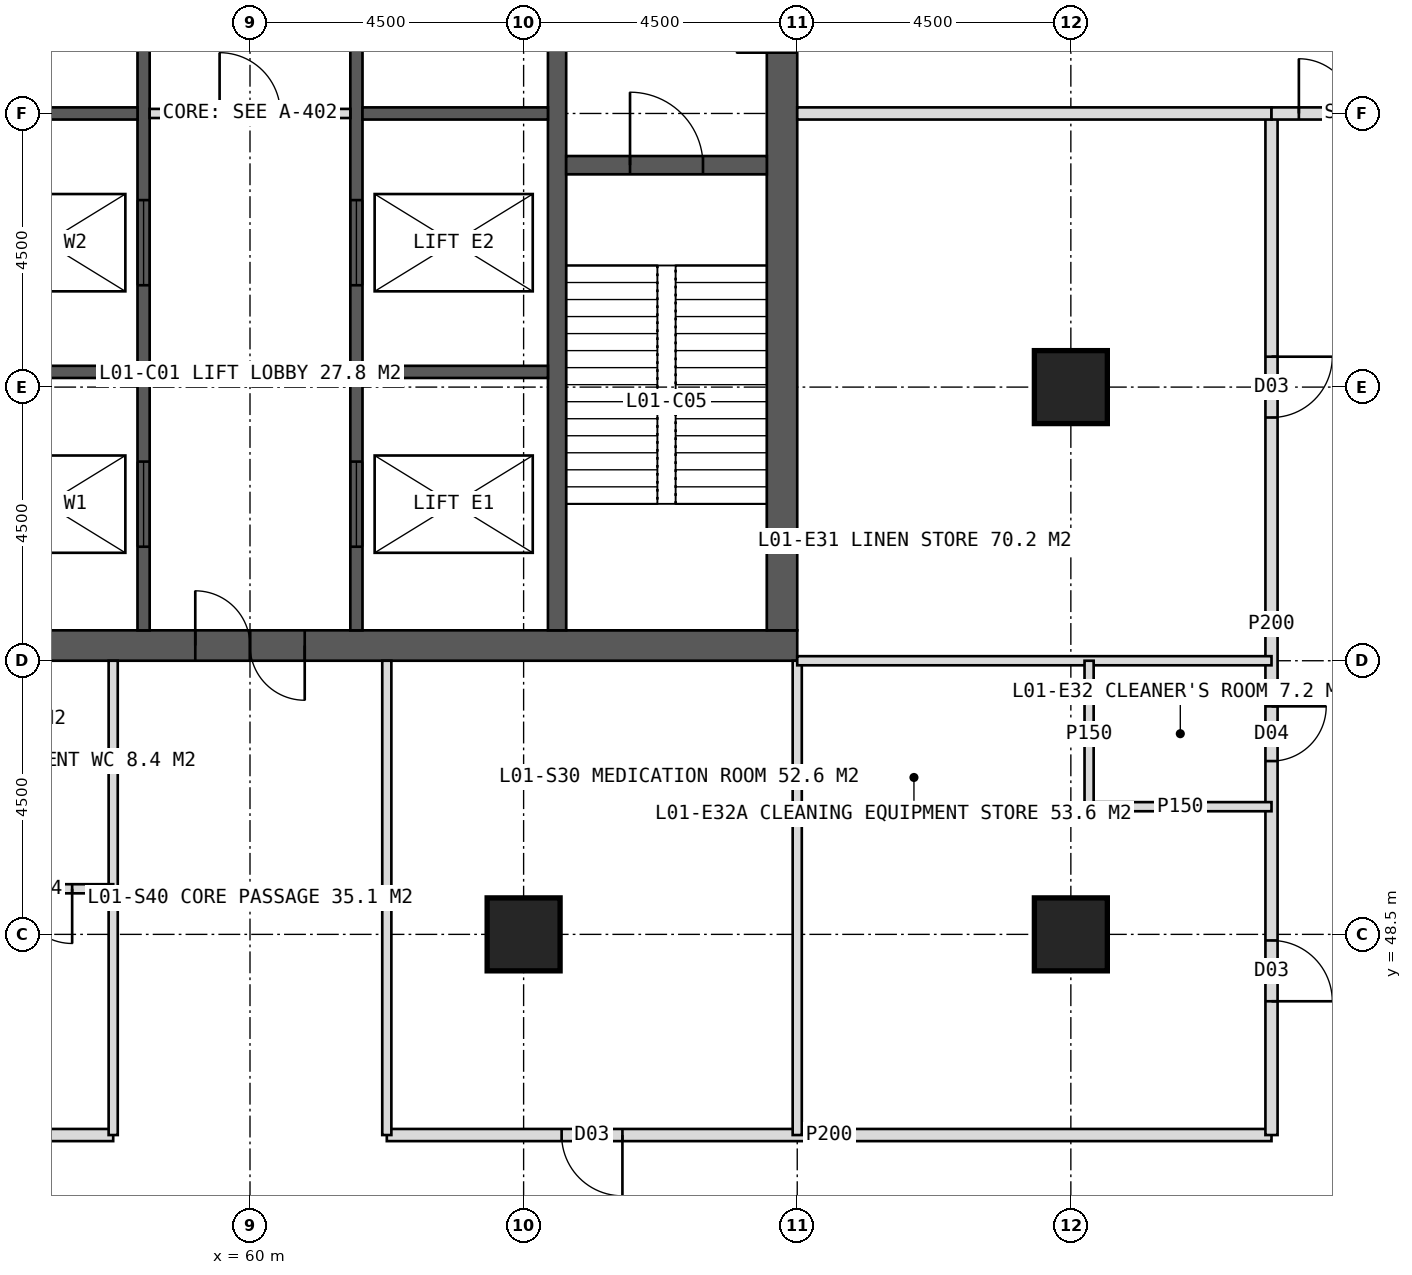
"""IFC4 building model, lengths in metres.
Left out: names, types, materials, properties, quantities, classifications, styles, units other than length and angle.
Written with IfcOpenShell. Run it as: python <this file> out.ifc"""

import sys

from ifc_helpers import new_model, si_unit, direction, frame, frame_2d, origin, origin_2d, place, context, subcontext, project, spatial, rectangle, hollow_rectangle, extrude, element, fill, save


model = new_model("IFC4")
c1 = context("Model", 3, precision=1e-05, world=origin(), true_north=direction((0.0, 1.0)))
c2 = subcontext(c1, "Body", "Model", "MODEL_VIEW")
j1 = project(units=[si_unit("LENGTHUNIT", "METRE"), si_unit("PLANEANGLEUNIT", "RADIAN")], contexts=[c1])
p1 = place(None, origin())
s1 = spatial("IfcSite", under=j1, at=p1, CompositionType="ELEMENT")
p2 = place(p1, origin())
s2 = spatial("IfcBuilding", under=s1, at=p2, CompositionType="ELEMENT")
p3 = place(p2, frame((0.0, 0.0, 6.0)))
s3 = spatial("IfcBuildingStorey", under=s2, at=p3, CompositionType="ELEMENT", Elevation=6.0)
p4 = place(p3, frame((51.0, 53.25, 0.0), z_axis=(0.0, 0.0, 1.0), x_axis=(1.0, 0.0, 0.0)))
e1 = element("IfcWall", 1, at=p4, inside=s3, PredefinedType="SHEAR", context=c2, shape_type="SweptSolid", body=[
    extrude(rectangle(XDim=18.0, YDim=0.5, at=frame_2d((9.0, 0.0))), origin(), (0.0, 0.0, 1.0), 5.0),
])
p5 = place(p4, frame((8.1, 0.0, 0.0)))
e2 = element("IfcOpeningElement", 2, at=p5, cuts=e1, PredefinedType="OPENING", context=c2, shape_type="SweptSolid", body=[
    extrude(rectangle(XDim=1.8, YDim=2.2, at=frame_2d((0.9, 1.1))), frame((0.0, 0.26, 0.0), z_axis=(0.0, -1.0, 0.0), x_axis=(1.0, 0.0, 0.0)), (0.0, 0.0, 1.0), 0.52),
])
p6 = place(p3, frame((68.75, 53.5, 0.0), z_axis=(0.0, 0.0, 1.0), x_axis=(0.0, 1.0, 0.0)))
e3 = element("IfcWall", 3, at=p6, inside=s3, PredefinedType="SHEAR", context=c2, shape_type="SweptSolid", body=[
    extrude(rectangle(XDim=17.0, YDim=0.5, at=frame_2d((8.5, 0.0))), origin(), (0.0, 0.0, 1.0), 5.0),
])
p7 = place(p6, frame((9.5, 0.0, 0.0)))
e4 = element("IfcOpeningElement", 4, at=p7, cuts=e3, PredefinedType="OPENING", context=c2, shape_type="SweptSolid", body=[
    extrude(rectangle(XDim=1.5, YDim=2.2, at=frame_2d((0.75, 1.1))), frame((0.0, 0.26, 0.0), z_axis=(0.0, -1.0, 0.0), x_axis=(1.0, 0.0, 0.0)), (0.0, 0.0, 1.0), 0.52),
])
p8 = place(p3, frame((65.05, 53.5, 0.0), z_axis=(0.0, 0.0, 1.0), x_axis=(0.0, 1.0, 0.0)))
e5 = element("IfcWall", 5, at=p8, inside=s3, PredefinedType="SHEAR", context=c2, shape_type="SweptSolid", body=[
    extrude(rectangle(XDim=17.0, YDim=0.3, at=frame_2d((8.5, 0.0))), origin(), (0.0, 0.0, 1.0), 5.0),
])
p9 = place(p3, frame((58.25, 53.5, 0.0), z_axis=(0.0, 0.0, 1.0), x_axis=(0.0, 1.0, 0.0)))
e6 = element("IfcWall", 6, at=p9, inside=s3, PredefinedType="SHEAR", context=c2, shape_type="SweptSolid", body=[
    extrude(rectangle(XDim=17.0, YDim=0.2, at=frame_2d((8.5, 0.0))), origin(), (0.0, 0.0, 1.0), 5.0),
])
p10 = place(p9, frame((1.375, 0.0, 0.0)))
e7 = element("IfcOpeningElement", 7, at=p10, cuts=e6, PredefinedType="OPENING", context=c2, shape_type="SweptSolid", body=[
    extrude(rectangle(XDim=1.4, YDim=2.2, at=frame_2d((0.7, 1.1))), frame((0.0, 0.11, 0.0), z_axis=(0.0, -1.0, 0.0), x_axis=(1.0, 0.0, 0.0)), (0.0, 0.0, 1.0), 0.22),
])
p11 = place(p9, frame((5.675, 0.0, 0.0)))
e8 = element("IfcOpeningElement", 8, at=p11, cuts=e6, PredefinedType="OPENING", context=c2, shape_type="SweptSolid", body=[
    extrude(rectangle(XDim=1.4, YDim=2.2, at=frame_2d((0.7, 1.1))), frame((0.0, 0.11, 0.0), z_axis=(0.0, -1.0, 0.0), x_axis=(1.0, 0.0, 0.0)), (0.0, 0.0, 1.0), 0.22),
])
p12 = place(p3, frame((61.75, 53.5, 0.0), z_axis=(0.0, 0.0, 1.0), x_axis=(0.0, 1.0, 0.0)))
e9 = element("IfcWall", 9, at=p12, inside=s3, PredefinedType="SHEAR", context=c2, shape_type="SweptSolid", body=[
    extrude(rectangle(XDim=17.0, YDim=0.2, at=frame_2d((8.5, 0.0))), origin(), (0.0, 0.0, 1.0), 5.0),
])
p13 = place(p12, frame((1.375, 0.0, 0.0)))
e10 = element("IfcOpeningElement", 10, at=p13, cuts=e9, PredefinedType="OPENING", context=c2, shape_type="SweptSolid", body=[
    extrude(rectangle(XDim=1.4, YDim=2.2, at=frame_2d((0.7, 1.1))), frame((0.0, 0.11, 0.0), z_axis=(0.0, -1.0, 0.0), x_axis=(1.0, 0.0, 0.0)), (0.0, 0.0, 1.0), 0.22),
])
p14 = place(p12, frame((5.675, 0.0, 0.0)))
e11 = element("IfcOpeningElement", 11, at=p14, cuts=e9, PredefinedType="OPENING", context=c2, shape_type="SweptSolid", body=[
    extrude(rectangle(XDim=1.4, YDim=2.2, at=frame_2d((0.7, 1.1))), frame((0.0, 0.11, 0.0), z_axis=(0.0, -1.0, 0.0), x_axis=(1.0, 0.0, 0.0)), (0.0, 0.0, 1.0), 0.22),
])
for number, where, z_axis, x_axis in (
    (12, (55.1, 57.75, 0.0), (0.0, 0.0, 1.0), (1.0, 0.0, 0.0)),
    (13, (61.85, 57.75, 0.0), (0.0, 0.0, 1.0), (1.0, 0.0, 0.0)),
    (14, (55.1, 62.0, 0.0), (0.0, 0.0, 1.0), (1.0, 0.0, 0.0)),
    (15, (61.85, 62.0, 0.0), (0.0, 0.0, 1.0), (1.0, 0.0, 0.0)),
):
    element("IfcWall", number, at=place(p3, frame(where, z_axis=z_axis, x_axis=x_axis)), inside=s3, PredefinedType="SHEAR", context=c2, shape_type="SweptSolid", body=[
        extrude(rectangle(XDim=3.05, YDim=0.2, at=frame_2d((1.525, 0.0))), origin(), (0.0, 0.0, 1.0), 5.0),
    ])
p15 = place(p3, frame((65.2, 61.15, 0.0), z_axis=(0.0, 0.0, 1.0), x_axis=(1.0, 0.0, 0.0)))
e16 = element("IfcWall", 16, at=p15, inside=s3, PredefinedType="SHEAR", context=c2, shape_type="SweptSolid", body=[
    extrude(rectangle(XDim=3.3, YDim=0.3, at=frame_2d((1.65, 0.0))), origin(), (0.0, 0.0, 1.0), 5.0),
])
p16 = place(p15, frame((1.05, 0.0, 0.0)))
e17 = element("IfcOpeningElement", 17, at=p16, cuts=e16, PredefinedType="OPENING", context=c2, shape_type="SweptSolid", body=[
    extrude(rectangle(XDim=1.2, YDim=2.1, at=frame_2d((0.6, 1.05))), frame((0.0, 0.16, 0.0), z_axis=(0.0, -1.0, 0.0), x_axis=(1.0, 0.0, 0.0)), (0.0, 0.0, 1.0), 0.32),
])
for number, where, z_axis, x_axis in (
    (18, (73.5, 48.5, 0.0), (0.0, 0.0, 1.0), (1.0, 0.0, 0.0)),
    (19, (64.5, 48.5, 0.0), (0.0, 0.0, 1.0), (1.0, 0.0, 0.0)),
    (20, (73.5, 57.5, 0.0), (0.0, 0.0, 1.0), (1.0, 0.0, 0.0)),
):
    element("IfcColumn", number, at=place(p3, frame(where, z_axis=z_axis, x_axis=x_axis)), inside=s3, PredefinedType="COLUMN", context=c2, shape_type="SweptSolid", body=[
        extrude(hollow_rectangle(XDim=1.2, YDim=1.2, WallThickness=0.1, at=origin_2d()), origin(), (0.0, 0.0, 1.0), 5.0),
    ])
p17 = place(p3, frame((76.8, 45.2, 0.0), z_axis=(0.0, 0.0, 1.0), x_axis=(-1.0, 0.0, 0.0)))
e21 = element("IfcWall", 21, at=p17, inside=s3, PredefinedType="PARTITIONING", context=c2, shape_type="SweptSolid", body=[
    extrude(rectangle(XDim=14.55, YDim=0.2, at=frame_2d((7.275, 0.0))), origin(), (0.0, 0.0, 1.0), 4.7),
])
p18 = place(p17, frame((10.675, 0.0, 0.0)))
e22 = element("IfcOpeningElement", 22, at=p18, cuts=e21, PredefinedType="OPENING", context=c2, shape_type="SweptSolid", body=[
    extrude(rectangle(XDim=1.0, YDim=2.1, at=frame_2d((0.5, 1.05))), frame((0.0, 0.11, 0.0), z_axis=(0.0, -1.0, 0.0), x_axis=(1.0, 0.0, 0.0)), (0.0, 0.0, 1.0), 0.22),
])
p19 = place(p3, frame((57.75, 45.2, 0.0), z_axis=(0.0, 0.0, 1.0), x_axis=(-1.0, 0.0, 0.0)))
e23 = element("IfcWall", 23, at=p19, inside=s3, PredefinedType="PARTITIONING", context=c2, shape_type="SweptSolid", body=[
    extrude(rectangle(XDim=14.55, YDim=0.2, at=frame_2d((7.275, 0.0))), origin(), (0.0, 0.0, 1.0), 4.7),
])
p20 = place(p19, frame((2.875, 0.0, 0.0)))
e24 = element("IfcOpeningElement", 24, at=p20, cuts=e23, PredefinedType="OPENING", context=c2, shape_type="SweptSolid", body=[
    extrude(rectangle(XDim=1.0, YDim=2.1, at=frame_2d((0.5, 1.05))), frame((0.0, 0.11, 0.0), z_axis=(0.0, -1.0, 0.0), x_axis=(1.0, 0.0, 0.0)), (0.0, 0.0, 1.0), 0.22),
])
p21 = place(p19, frame((10.15, 0.0, 0.0)))
e25 = element("IfcOpeningElement", 25, at=p21, cuts=e23, PredefinedType="OPENING", context=c2, shape_type="SweptSolid", body=[
    extrude(rectangle(XDim=1.0, YDim=2.1, at=frame_2d((0.5, 1.05))), frame((0.0, 0.11, 0.0), z_axis=(0.0, -1.0, 0.0), x_axis=(1.0, 0.0, 0.0)), (0.0, 0.0, 1.0), 0.22),
])
for number, where, z_axis, x_axis in (
    (26, (69.0, 53.0, 0.0), (0.0, 0.0, 1.0), (0.0, -1.0, 0.0)),
    (27, (62.25, 53.0, 0.0), (0.0, 0.0, 1.0), (0.0, -1.0, 0.0)),
    (28, (57.75, 53.0, 0.0), (0.0, 0.0, 1.0), (0.0, -1.0, 0.0)),
):
    element("IfcWall", number, at=place(p3, frame(where, z_axis=z_axis, x_axis=x_axis)), inside=s3, PredefinedType="PARTITIONING", context=c2, shape_type="SweptSolid", body=[
        extrude(rectangle(XDim=7.8, YDim=0.15, at=frame_2d((3.9, 0.0))), origin(), (0.0, 0.0, 1.0), 4.7),
    ])
p22 = place(p3, frame((57.75, 49.25, 0.0), z_axis=(0.0, 0.0, 1.0), x_axis=(-1.0, 0.0, 0.0)))
e29 = element("IfcWall", 29, at=p22, inside=s3, PredefinedType="PARTITIONING", context=c2, shape_type="SweptSolid", body=[
    extrude(rectangle(XDim=6.75, YDim=0.15, at=frame_2d((3.375, 0.0))), origin(), (0.0, 0.0, 1.0), 4.7),
])
p23 = place(p22, frame((0.675, 0.0, 0.0)))
e30 = element("IfcOpeningElement", 30, at=p23, cuts=e29, PredefinedType="OPENING", context=c2, shape_type="SweptSolid", body=[
    extrude(rectangle(XDim=0.9, YDim=2.1, at=frame_2d((0.45, 1.05))), frame((0.0, 0.085, 0.0), z_axis=(0.0, -1.0, 0.0), x_axis=(1.0, 0.0, 0.0)), (0.0, 0.0, 1.0), 0.17),
])
p24 = place(p22, frame((3.05, 0.0, 0.0)))
e31 = element("IfcOpeningElement", 31, at=p24, cuts=e29, PredefinedType="OPENING", context=c2, shape_type="SweptSolid", body=[
    extrude(rectangle(XDim=1.0, YDim=2.1, at=frame_2d((0.5, 1.05))), frame((0.0, 0.085, 0.0), z_axis=(0.0, -1.0, 0.0), x_axis=(1.0, 0.0, 0.0)), (0.0, 0.0, 1.0), 0.17),
])
p25 = place(p22, frame((5.35, 0.0, 0.0)))
e32 = element("IfcOpeningElement", 32, at=p25, cuts=e29, PredefinedType="OPENING", context=c2, shape_type="SweptSolid", body=[
    extrude(rectangle(XDim=0.9, YDim=2.1, at=frame_2d((0.45, 1.05))), frame((0.0, 0.085, 0.0), z_axis=(0.0, -1.0, 0.0), x_axis=(1.0, 0.0, 0.0)), (0.0, 0.0, 1.0), 0.17),
])
p26 = place(p3, frame((76.8, 62.0, 0.0), z_axis=(0.0, 0.0, 1.0), x_axis=(0.0, -1.0, 0.0)))
e33 = element("IfcWall", 33, at=p26, inside=s3, PredefinedType="PARTITIONING", context=c2, shape_type="SweptSolid", body=[
    extrude(rectangle(XDim=16.8, YDim=0.2, at=frame_2d((8.4, 0.0))), origin(), (0.0, 0.0, 1.0), 4.7),
])
p27 = place(p26, frame((4.0, 0.0, 0.0)))
e34 = element("IfcOpeningElement", 34, at=p27, cuts=e33, PredefinedType="OPENING", context=c2, shape_type="SweptSolid", body=[
    extrude(rectangle(XDim=1.0, YDim=2.1, at=frame_2d((0.5, 1.05))), frame((0.0, 0.11, 0.0), z_axis=(0.0, -1.0, 0.0), x_axis=(1.0, 0.0, 0.0)), (0.0, 0.0, 1.0), 0.22),
])
p28 = place(p26, frame((9.75, 0.0, 0.0)))
e35 = element("IfcOpeningElement", 35, at=p28, cuts=e33, PredefinedType="OPENING", context=c2, shape_type="SweptSolid", body=[
    extrude(rectangle(XDim=0.9, YDim=2.1, at=frame_2d((0.45, 1.05))), frame((0.0, 0.11, 0.0), z_axis=(0.0, -1.0, 0.0), x_axis=(1.0, 0.0, 0.0)), (0.0, 0.0, 1.0), 0.22),
])
p29 = place(p26, frame((13.6, 0.0, 0.0)))
e36 = element("IfcOpeningElement", 36, at=p29, cuts=e33, PredefinedType="OPENING", context=c2, shape_type="SweptSolid", body=[
    extrude(rectangle(XDim=1.0, YDim=2.1, at=frame_2d((0.5, 1.05))), frame((0.0, 0.11, 0.0), z_axis=(0.0, -1.0, 0.0), x_axis=(1.0, 0.0, 0.0)), (0.0, 0.0, 1.0), 0.22),
])
p30 = place(p3, frame((69.0, 62.0, 0.0), z_axis=(0.0, 0.0, 1.0), x_axis=(1.0, 0.0, 0.0)))
e37 = element("IfcWall", 37, at=p30, inside=s3, PredefinedType="SOLIDWALL", context=c2, shape_type="SweptSolid", body=[
    extrude(rectangle(XDim=7.8, YDim=0.2, at=frame_2d((3.9, 0.0))), origin(), (0.0, 0.0, 1.0), 3.9),
])
p31 = place(p3, frame((69.0, 53.0, 0.0), z_axis=(0.0, 0.0, 1.0), x_axis=(1.0, 0.0, 0.0)))
e38 = element("IfcWall", 38, at=p31, inside=s3, PredefinedType="PARTITIONING", context=c2, shape_type="SweptSolid", body=[
    extrude(rectangle(XDim=7.8, YDim=0.15, at=frame_2d((3.9, 0.0))), origin(), (0.0, 0.0, 1.0), 4.7),
])
p32 = place(p3, frame((73.8, 50.6, 0.0), z_axis=(0.0, 0.0, 1.0), x_axis=(1.0, 0.0, 0.0)))
e39 = element("IfcWall", 39, at=p32, inside=s3, PredefinedType="PARTITIONING", context=c2, shape_type="SweptSolid", body=[
    extrude(rectangle(XDim=3.0, YDim=0.15, at=frame_2d((1.5, 0.0))), origin(), (0.0, 0.0, 1.0), 4.7),
])
p33 = place(p3, frame((73.8, 53.0, 0.0), z_axis=(0.0, 0.0, 1.0), x_axis=(0.0, -1.0, 0.0)))
e40 = element("IfcWall", 40, at=p33, inside=s3, PredefinedType="PARTITIONING", context=c2, shape_type="SweptSolid", body=[
    extrude(rectangle(XDim=2.4, YDim=0.15, at=frame_2d((1.2, 0.0))), origin(), (0.0, 0.0, 1.0), 4.7),
])
p34 = place(p3, frame((76.8, 62.0, 0.0), z_axis=(0.0, 0.0, 1.0), x_axis=(1.0, 0.0, 0.0)))
e41 = element("IfcWall", 41, at=p34, inside=s3, PredefinedType="SOLIDWALL", context=c2, shape_type="SweptSolid", body=[
    extrude(rectangle(XDim=2.7, YDim=0.2, at=frame_2d((1.35, 0.0))), origin(), (0.0, 0.0, 1.0), 3.9),
])
p35 = place(p34, frame((0.45, 0.0, 0.0)))
e42 = element("IfcOpeningElement", 42, at=p35, cuts=e41, PredefinedType="OPENING", context=c2, shape_type="SweptSolid", body=[
    extrude(rectangle(XDim=1.8, YDim=2.2, at=frame_2d((0.9, 1.1))), frame((0.0, 0.11, 0.0), z_axis=(0.0, -1.0, 0.0), x_axis=(1.0, 0.0, 0.0)), (0.0, 0.0, 1.0), 0.22),
])
p36 = place(p3, frame((58.35, 62.0, 0.0), z_axis=(0.0, 0.0, 1.0), x_axis=(1.0, 0.0, 0.0)))
e43 = element("IfcWall", 43, at=p36, inside=s3, PredefinedType="PARTITIONING", context=c2, shape_type="SweptSolid", body=[
    extrude(rectangle(XDim=3.3, YDim=0.15, at=frame_2d((1.65, 0.0))), origin(), (0.0, 0.0, 1.0), 4.7),
])
p37 = place(p36, frame((1.15, 0.0, 0.0)))
e44 = element("IfcOpeningElement", 44, at=p37, cuts=e43, PredefinedType="OPENING", context=c2, shape_type="SweptSolid", body=[
    extrude(rectangle(XDim=1.0, YDim=2.1, at=frame_2d((0.5, 1.05))), frame((0.0, 0.085, 0.0), z_axis=(0.0, -1.0, 0.0), x_axis=(1.0, 0.0, 0.0)), (0.0, 0.0, 1.0), 0.17),
])
p38 = place(p18, origin())
e45 = element("IfcDoor", 45, at=p38, inside=s3, OperationType="SINGLE_SWING_LEFT", PredefinedType="DOOR", context=c2, shape_type="SweptSolid", body=[
    extrude(rectangle(XDim=1.0, YDim=2.1, at=frame_2d((0.5, 1.05))), frame((0.0, 0.025, 0.0), z_axis=(0.0, -1.0, 0.0), x_axis=(1.0, 0.0, 0.0)), (0.0, 0.0, 1.0), 0.05),
])
fill(e22, e45)
p39 = place(p27, origin())
e46 = element("IfcDoor", 46, at=p39, inside=s3, OperationType="SINGLE_SWING_LEFT", PredefinedType="DOOR", context=c2, shape_type="SweptSolid", body=[
    extrude(rectangle(XDim=1.0, YDim=2.1, at=frame_2d((0.5, 1.05))), frame((0.0, 0.025, 0.0), z_axis=(0.0, -1.0, 0.0), x_axis=(1.0, 0.0, 0.0)), (0.0, 0.0, 1.0), 0.05),
])
fill(e34, e46)
p40 = place(p35, origin())
e47 = element("IfcDoor", 47, at=p40, inside=s3, OperationType="DOUBLE_DOOR_DOUBLE_SWING", PredefinedType="DOOR", context=c2, shape_type="SweptSolid", body=[
    extrude(rectangle(XDim=1.8, YDim=2.2, at=frame_2d((0.9, 1.1))), frame((0.0, 0.025, 0.0), z_axis=(0.0, -1.0, 0.0), x_axis=(1.0, 0.0, 0.0)), (0.0, 0.0, 1.0), 0.05),
])
fill(e42, e47)
p41 = place(p5, origin())
e48 = element("IfcDoor", 48, at=p41, inside=s3, OperationType="DOUBLE_DOOR_SINGLE_SWING", PredefinedType="DOOR", context=c2, shape_type="SweptSolid", body=[
    extrude(rectangle(XDim=1.8, YDim=2.2, at=frame_2d((0.9, 1.1))), frame((0.0, 0.025, 0.0), z_axis=(0.0, -1.0, 0.0), x_axis=(1.0, 0.0, 0.0)), (0.0, 0.0, 1.0), 0.05),
])
fill(e2, e48)
p42 = place(p16, origin())
e49 = element("IfcDoor", 49, at=p42, inside=s3, OperationType="SINGLE_SWING_LEFT", PredefinedType="DOOR", context=c2, shape_type="SweptSolid", body=[
    extrude(rectangle(XDim=1.2, YDim=2.1, at=frame_2d((0.6, 1.05))), frame((0.0, 0.025, 0.0), z_axis=(0.0, -1.0, 0.0), x_axis=(1.0, 0.0, 0.0)), (0.0, 0.0, 1.0), 0.05),
])
fill(e17, e49)
p43 = place(p10, origin())
e50 = element("IfcDoor", 50, at=p43, inside=s3, OperationType="SLIDING_TO_LEFT", PredefinedType="DOOR", context=c2, shape_type="SweptSolid", body=[
    extrude(rectangle(XDim=1.4, YDim=2.2, at=frame_2d((0.7, 1.1))), frame((0.0, 0.025, 0.0), z_axis=(0.0, -1.0, 0.0), x_axis=(1.0, 0.0, 0.0)), (0.0, 0.0, 1.0), 0.05),
])
fill(e7, e50)
p44 = place(p13, origin())
e51 = element("IfcDoor", 51, at=p44, inside=s3, OperationType="SLIDING_TO_LEFT", PredefinedType="DOOR", context=c2, shape_type="SweptSolid", body=[
    extrude(rectangle(XDim=1.4, YDim=2.2, at=frame_2d((0.7, 1.1))), frame((0.0, 0.025, 0.0), z_axis=(0.0, -1.0, 0.0), x_axis=(1.0, 0.0, 0.0)), (0.0, 0.0, 1.0), 0.05),
])
fill(e10, e51)
p45 = place(p11, origin())
e52 = element("IfcDoor", 52, at=p45, inside=s3, OperationType="SLIDING_TO_LEFT", PredefinedType="DOOR", context=c2, shape_type="SweptSolid", body=[
    extrude(rectangle(XDim=1.4, YDim=2.2, at=frame_2d((0.7, 1.1))), frame((0.0, 0.025, 0.0), z_axis=(0.0, -1.0, 0.0), x_axis=(1.0, 0.0, 0.0)), (0.0, 0.0, 1.0), 0.05),
])
fill(e8, e52)
p46 = place(p14, origin())
e53 = element("IfcDoor", 53, at=p46, inside=s3, OperationType="SLIDING_TO_LEFT", PredefinedType="DOOR", context=c2, shape_type="SweptSolid", body=[
    extrude(rectangle(XDim=1.4, YDim=2.2, at=frame_2d((0.7, 1.1))), frame((0.0, 0.025, 0.0), z_axis=(0.0, -1.0, 0.0), x_axis=(1.0, 0.0, 0.0)), (0.0, 0.0, 1.0), 0.05),
])
fill(e11, e53)
p47 = place(p37, origin())
e54 = element("IfcDoor", 54, at=p47, inside=s3, OperationType="SINGLE_SWING_LEFT", PredefinedType="DOOR", context=c2, shape_type="SweptSolid", body=[
    extrude(rectangle(XDim=1.0, YDim=2.1, at=frame_2d((0.5, 1.05))), frame((0.0, 0.025, 0.0), z_axis=(0.0, -1.0, 0.0), x_axis=(1.0, 0.0, 0.0)), (0.0, 0.0, 1.0), 0.05),
])
fill(e44, e54)
p48 = place(p23, origin())
e55 = element("IfcDoor", 55, at=p48, inside=s3, OperationType="SINGLE_SWING_LEFT", PredefinedType="DOOR", context=c2, shape_type="SweptSolid", body=[
    extrude(rectangle(XDim=0.9, YDim=2.1, at=frame_2d((0.45, 1.05))), frame((0.0, 0.025, 0.0), z_axis=(0.0, -1.0, 0.0), x_axis=(1.0, 0.0, 0.0)), (0.0, 0.0, 1.0), 0.05),
])
fill(e30, e55)
p49 = place(p28, origin())
e56 = element("IfcDoor", 56, at=p49, inside=s3, OperationType="SINGLE_SWING_LEFT", PredefinedType="DOOR", context=c2, shape_type="SweptSolid", body=[
    extrude(rectangle(XDim=0.9, YDim=2.1, at=frame_2d((0.45, 1.05))), frame((0.0, 0.025, 0.0), z_axis=(0.0, -1.0, 0.0), x_axis=(1.0, 0.0, 0.0)), (0.0, 0.0, 1.0), 0.05),
])
fill(e35, e56)
p50 = place(p29, origin())
e57 = element("IfcDoor", 57, at=p50, inside=s3, OperationType="SINGLE_SWING_RIGHT", PredefinedType="DOOR", context=c2, shape_type="SweptSolid", body=[
    extrude(rectangle(XDim=1.0, YDim=2.1, at=frame_2d((0.5, 1.05))), frame((0.0, 0.025, 0.0), z_axis=(0.0, -1.0, 0.0), x_axis=(1.0, 0.0, 0.0)), (0.0, 0.0, 1.0), 0.05),
])
fill(e36, e57)
save(model, sys.argv[1])
